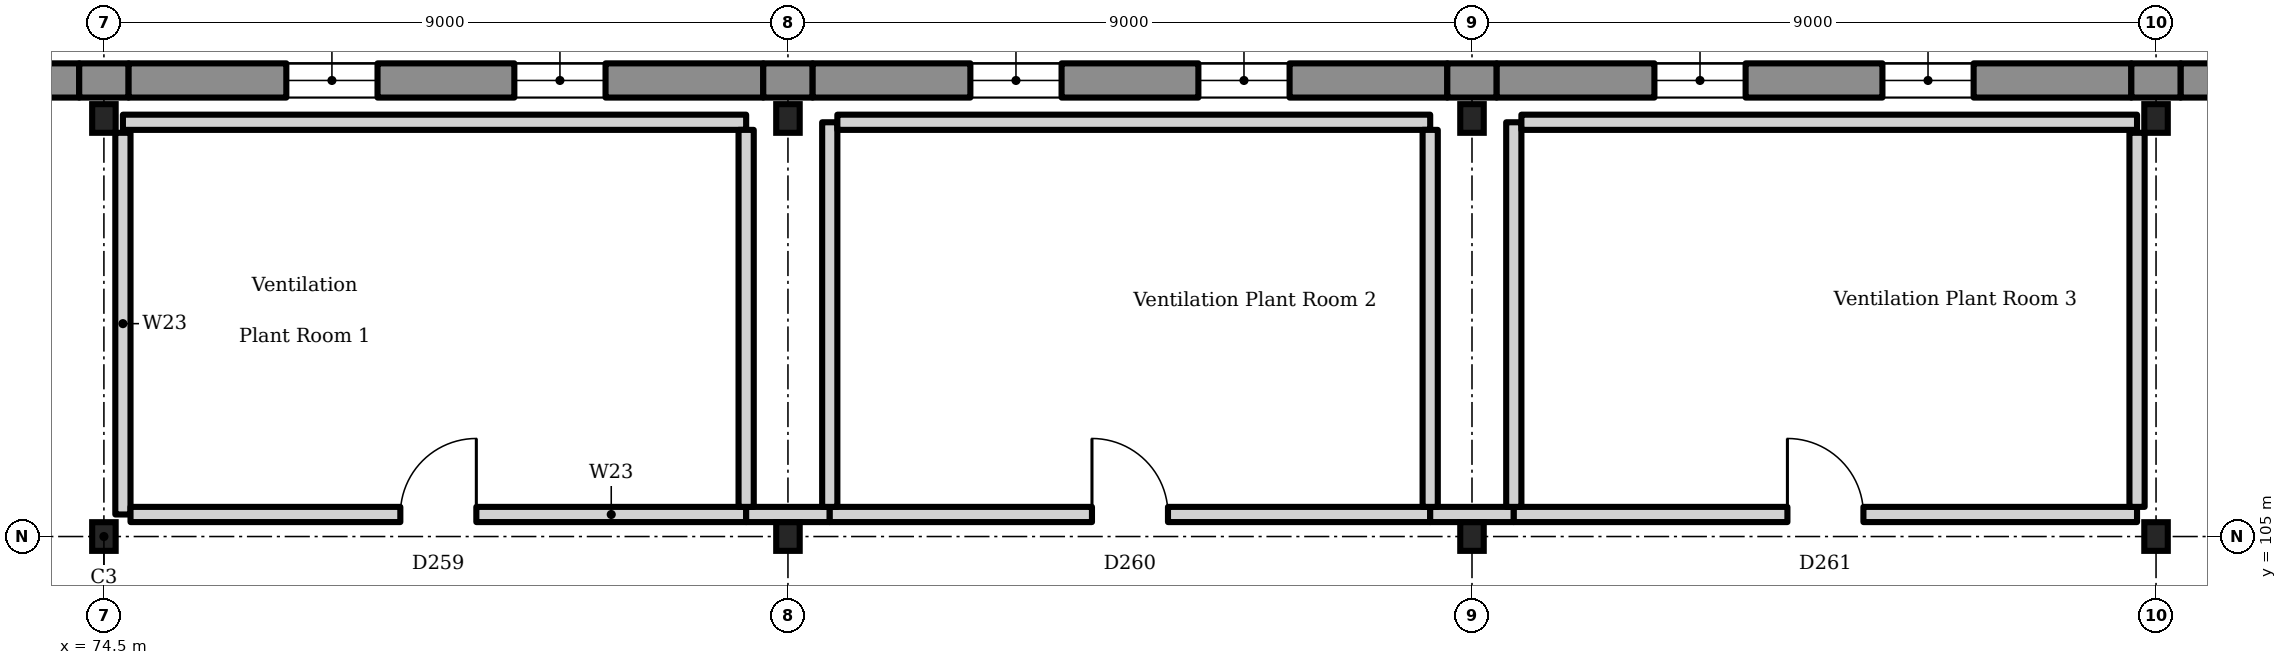
"""IFC4 building model, lengths in metres.
Left out: names, types, materials, properties, quantities, classifications, styles, units other than length and angle.
Written with IfcOpenShell. Run it as: python <this file> out.ifc"""

import sys

from ifc_helpers import new_model, si_unit, direction, frame, frame_2d, origin, origin_2d, place, context, subcontext, project, spatial, rectangle, i_section, extrude, element, fill, save


model = new_model("IFC4")
c1 = context("Model", 3, precision=1e-05, world=origin(), true_north=direction((0.0, 1.0)))
c2 = subcontext(c1, "Body", "Model", "MODEL_VIEW")
j1 = project(units=[si_unit("LENGTHUNIT", "METRE"), si_unit("PLANEANGLEUNIT", "RADIAN")], contexts=[c1])
p1 = place(None, origin())
s1 = spatial("IfcSite", under=j1, at=p1, CompositionType="ELEMENT")
p2 = place(p1, origin())
s2 = spatial("IfcBuilding", under=s1, at=p2, CompositionType="ELEMENT")
p3 = place(p2, frame((0.0, 0.0, 5.4)))
s3 = spatial("IfcBuildingStorey", under=s2, at=p3, CompositionType="ELEMENT", Elevation=5.4)
for number, where, z_axis, x_axis in (
    (1, (74.5, 105.0, 0.0), (0.0, 0.0, 1.0), (1.0, 0.0, 0.0)),
    (2, (83.5, 105.0, 0.0), (0.0, 0.0, 1.0), (1.0, 0.0, 0.0)),
    (3, (92.5, 105.0, 0.0), (0.0, 0.0, 1.0), (1.0, 0.0, 0.0)),
    (4, (101.5, 105.0, 0.0), (0.0, 0.0, 1.0), (1.0, 0.0, 0.0)),
    (5, (74.5, 110.5, 0.0), (0.0, 0.0, 1.0), (1.0, 0.0, 0.0)),
    (6, (83.5, 110.5, 0.0), (0.0, 0.0, 1.0), (1.0, 0.0, 0.0)),
    (7, (92.5, 110.5, 0.0), (0.0, 0.0, 1.0), (1.0, 0.0, 0.0)),
    (8, (101.5, 110.5, 0.0), (0.0, 0.0, 1.0), (1.0, 0.0, 0.0)),
):
    element("IfcColumn", number, at=place(p3, frame(where, z_axis=z_axis, x_axis=x_axis)), inside=s3, PredefinedType="COLUMN", context=c2, shape_type="SweptSolid", body=[
        extrude(i_section(OverallWidth=0.309, OverallDepth=0.377, WebThickness=0.021, FlangeThickness=0.04, FilletRadius=0.027, at=origin_2d()), origin(), (0.0, 0.0, 1.0), 4.5),
    ])
p4 = place(p3, frame((65.825, 111.0, 0.0), z_axis=(0.0, 0.0, 1.0), x_axis=(1.0, 0.0, 0.0)))
e9 = element("IfcWall", 9, at=p4, inside=s3, PredefinedType="SOLIDWALL", context=c2, shape_type="SweptSolid", body=[
    extrude(rectangle(XDim=8.35, YDim=0.45, at=frame_2d((4.175, 0.0))), origin(), (0.0, 0.0, 1.0), 3.8),
])
p5 = place(p4, frame((2.075, 0.0, 0.8)))
e10 = element("IfcOpeningElement", 10, at=p5, cuts=e9, PredefinedType="OPENING", context=c2, shape_type="SweptSolid", body=[
    extrude(rectangle(XDim=1.2, YDim=1.4, at=frame_2d((0.6, 0.7))), frame((0.0, 0.235, 0.0), z_axis=(0.0, -1.0, 0.0), x_axis=(1.0, 0.0, 0.0)), (0.0, 0.0, 1.0), 0.47),
])
p6 = place(p4, frame((5.075, 0.0, 0.8)))
e11 = element("IfcOpeningElement", 11, at=p6, cuts=e9, PredefinedType="OPENING", context=c2, shape_type="SweptSolid", body=[
    extrude(rectangle(XDim=1.2, YDim=1.4, at=frame_2d((0.6, 0.7))), frame((0.0, 0.235, 0.0), z_axis=(0.0, -1.0, 0.0), x_axis=(1.0, 0.0, 0.0)), (0.0, 0.0, 1.0), 0.47),
])
p7 = place(p3, frame((74.175, 111.0, 0.0), z_axis=(0.0, 0.0, 1.0), x_axis=(1.0, 0.0, 0.0)))
e12 = element("IfcWall", 12, at=p7, inside=s3, PredefinedType="SOLIDWALL", context=c2, shape_type="SweptSolid", body=[
    extrude(rectangle(XDim=0.65, YDim=0.45, at=frame_2d((0.325, 0.0))), origin(), (0.0, 0.0, 1.0), 2.3),
])
p8 = place(p3, frame((74.825, 111.0, 0.0), z_axis=(0.0, 0.0, 1.0), x_axis=(1.0, 0.0, 0.0)))
e13 = element("IfcWall", 13, at=p8, inside=s3, PredefinedType="SOLIDWALL", context=c2, shape_type="SweptSolid", body=[
    extrude(rectangle(XDim=8.35, YDim=0.45, at=frame_2d((4.175, 0.0))), origin(), (0.0, 0.0, 1.0), 3.8),
])
p9 = place(p8, frame((2.075, 0.0, 0.8)))
e14 = element("IfcOpeningElement", 14, at=p9, cuts=e13, PredefinedType="OPENING", context=c2, shape_type="SweptSolid", body=[
    extrude(rectangle(XDim=1.2, YDim=1.4, at=frame_2d((0.6, 0.7))), frame((0.0, 0.235, 0.0), z_axis=(0.0, -1.0, 0.0), x_axis=(1.0, 0.0, 0.0)), (0.0, 0.0, 1.0), 0.47),
])
p10 = place(p8, frame((5.075, 0.0, 0.8)))
e15 = element("IfcOpeningElement", 15, at=p10, cuts=e13, PredefinedType="OPENING", context=c2, shape_type="SweptSolid", body=[
    extrude(rectangle(XDim=1.2, YDim=1.4, at=frame_2d((0.6, 0.7))), frame((0.0, 0.235, 0.0), z_axis=(0.0, -1.0, 0.0), x_axis=(1.0, 0.0, 0.0)), (0.0, 0.0, 1.0), 0.47),
])
p11 = place(p3, frame((83.175, 111.0, 0.0), z_axis=(0.0, 0.0, 1.0), x_axis=(1.0, 0.0, 0.0)))
e16 = element("IfcWall", 16, at=p11, inside=s3, PredefinedType="SOLIDWALL", context=c2, shape_type="SweptSolid", body=[
    extrude(rectangle(XDim=0.65, YDim=0.45, at=frame_2d((0.325, 0.0))), origin(), (0.0, 0.0, 1.0), 2.3),
])
p12 = place(p3, frame((83.825, 111.0, 0.0), z_axis=(0.0, 0.0, 1.0), x_axis=(1.0, 0.0, 0.0)))
e17 = element("IfcWall", 17, at=p12, inside=s3, PredefinedType="SOLIDWALL", context=c2, shape_type="SweptSolid", body=[
    extrude(rectangle(XDim=8.35, YDim=0.45, at=frame_2d((4.175, 0.0))), origin(), (0.0, 0.0, 1.0), 3.8),
])
p13 = place(p12, frame((2.075, 0.0, 0.8)))
e18 = element("IfcOpeningElement", 18, at=p13, cuts=e17, PredefinedType="OPENING", context=c2, shape_type="SweptSolid", body=[
    extrude(rectangle(XDim=1.2, YDim=1.4, at=frame_2d((0.6, 0.7))), frame((0.0, 0.235, 0.0), z_axis=(0.0, -1.0, 0.0), x_axis=(1.0, 0.0, 0.0)), (0.0, 0.0, 1.0), 0.47),
])
p14 = place(p12, frame((5.075, 0.0, 0.8)))
e19 = element("IfcOpeningElement", 19, at=p14, cuts=e17, PredefinedType="OPENING", context=c2, shape_type="SweptSolid", body=[
    extrude(rectangle(XDim=1.2, YDim=1.4, at=frame_2d((0.6, 0.7))), frame((0.0, 0.235, 0.0), z_axis=(0.0, -1.0, 0.0), x_axis=(1.0, 0.0, 0.0)), (0.0, 0.0, 1.0), 0.47),
])
p15 = place(p3, frame((92.175, 111.0, 0.0), z_axis=(0.0, 0.0, 1.0), x_axis=(1.0, 0.0, 0.0)))
e20 = element("IfcWall", 20, at=p15, inside=s3, PredefinedType="SOLIDWALL", context=c2, shape_type="SweptSolid", body=[
    extrude(rectangle(XDim=0.65, YDim=0.45, at=frame_2d((0.325, 0.0))), origin(), (0.0, 0.0, 1.0), 2.3),
])
p16 = place(p3, frame((92.825, 111.0, 0.0), z_axis=(0.0, 0.0, 1.0), x_axis=(1.0, 0.0, 0.0)))
e21 = element("IfcWall", 21, at=p16, inside=s3, PredefinedType="SOLIDWALL", context=c2, shape_type="SweptSolid", body=[
    extrude(rectangle(XDim=8.35, YDim=0.45, at=frame_2d((4.175, 0.0))), origin(), (0.0, 0.0, 1.0), 3.8),
])
p17 = place(p16, frame((2.075, 0.0, 0.8)))
e22 = element("IfcOpeningElement", 22, at=p17, cuts=e21, PredefinedType="OPENING", context=c2, shape_type="SweptSolid", body=[
    extrude(rectangle(XDim=1.2, YDim=1.4, at=frame_2d((0.6, 0.7))), frame((0.0, 0.235, 0.0), z_axis=(0.0, -1.0, 0.0), x_axis=(1.0, 0.0, 0.0)), (0.0, 0.0, 1.0), 0.47),
])
p18 = place(p16, frame((5.075, 0.0, 0.8)))
e23 = element("IfcOpeningElement", 23, at=p18, cuts=e21, PredefinedType="OPENING", context=c2, shape_type="SweptSolid", body=[
    extrude(rectangle(XDim=1.2, YDim=1.4, at=frame_2d((0.6, 0.7))), frame((0.0, 0.235, 0.0), z_axis=(0.0, -1.0, 0.0), x_axis=(1.0, 0.0, 0.0)), (0.0, 0.0, 1.0), 0.47),
])
p19 = place(p3, frame((101.175, 111.0, 0.0), z_axis=(0.0, 0.0, 1.0), x_axis=(1.0, 0.0, 0.0)))
e24 = element("IfcWall", 24, at=p19, inside=s3, PredefinedType="SOLIDWALL", context=c2, shape_type="SweptSolid", body=[
    extrude(rectangle(XDim=0.65, YDim=0.45, at=frame_2d((0.325, 0.0))), origin(), (0.0, 0.0, 1.0), 2.3),
])
p20 = place(p3, frame((101.825, 111.0, 0.0), z_axis=(0.0, 0.0, 1.0), x_axis=(1.0, 0.0, 0.0)))
e25 = element("IfcWall", 25, at=p20, inside=s3, PredefinedType="SOLIDWALL", context=c2, shape_type="SweptSolid", body=[
    extrude(rectangle(XDim=8.35, YDim=0.45, at=frame_2d((4.175, 0.0))), origin(), (0.0, 0.0, 1.0), 3.8),
])
p21 = place(p20, frame((2.075, 0.0, 0.8)))
e26 = element("IfcOpeningElement", 26, at=p21, cuts=e25, PredefinedType="OPENING", context=c2, shape_type="SweptSolid", body=[
    extrude(rectangle(XDim=1.2, YDim=1.4, at=frame_2d((0.6, 0.7))), frame((0.0, 0.235, 0.0), z_axis=(0.0, -1.0, 0.0), x_axis=(1.0, 0.0, 0.0)), (0.0, 0.0, 1.0), 0.47),
])
p22 = place(p20, frame((5.075, 0.0, 0.8)))
e27 = element("IfcOpeningElement", 27, at=p22, cuts=e25, PredefinedType="OPENING", context=c2, shape_type="SweptSolid", body=[
    extrude(rectangle(XDim=1.2, YDim=1.4, at=frame_2d((0.6, 0.7))), frame((0.0, 0.235, 0.0), z_axis=(0.0, -1.0, 0.0), x_axis=(1.0, 0.0, 0.0)), (0.0, 0.0, 1.0), 0.47),
])
p23 = place(p3, frame((74.75, 110.312, 0.0), z_axis=(0.0, 0.0, 1.0), x_axis=(0.0, -1.0, 0.0)))
e28 = element("IfcWall", 28, at=p23, inside=s3, PredefinedType="SOLIDWALL", context=c2, shape_type="SweptSolid", body=[
    extrude(rectangle(XDim=5.021, YDim=0.2, at=frame_2d((2.511, 0.0))), origin(), (0.0, 0.0, 1.0), 2.3),
])
p24 = place(p3, frame((74.85, 105.29, 0.0), z_axis=(0.0, 0.0, 1.0), x_axis=(1.0, 0.0, 0.0)))
e29 = element("IfcWall", 29, at=p24, inside=s3, PredefinedType="SOLIDWALL", context=c2, shape_type="SweptSolid", body=[
    extrude(rectangle(XDim=8.1, YDim=0.2, at=frame_2d((4.05, 0.0))), origin(), (0.0, 0.0, 1.0), 2.3),
])
p25 = place(p24, frame((3.55, 0.0, 0.0)))
e30 = element("IfcOpeningElement", 30, at=p25, cuts=e29, PredefinedType="OPENING", context=c2, shape_type="SweptSolid", body=[
    extrude(rectangle(XDim=1.0, YDim=2.1, at=frame_2d((0.5, 1.05))), frame((0.0, 0.11, 0.0), z_axis=(0.0, -1.0, 0.0), x_axis=(1.0, 0.0, 0.0)), (0.0, 0.0, 1.0), 0.22),
])
p26 = place(p3, frame((82.95, 105.29, 0.0), z_axis=(0.0, 0.0, 1.0), x_axis=(1.0, 0.0, 0.0)))
e31 = element("IfcWall", 31, at=p26, inside=s3, PredefinedType="SOLIDWALL", context=c2, shape_type="SweptSolid", body=[
    extrude(rectangle(XDim=1.1, YDim=0.2, at=frame_2d((0.55, 0.0))), origin(), (0.0, 0.0, 1.0), 2.3),
])
p27 = place(p3, frame((84.05, 105.29, 0.0), z_axis=(0.0, 0.0, 1.0), x_axis=(1.0, 0.0, 0.0)))
e32 = element("IfcWall", 32, at=p27, inside=s3, PredefinedType="SOLIDWALL", context=c2, shape_type="SweptSolid", body=[
    extrude(rectangle(XDim=7.9, YDim=0.2, at=frame_2d((3.95, 0.0))), origin(), (0.0, 0.0, 1.0), 2.3),
])
p28 = place(p27, frame((3.45, 0.0, 0.0)))
e33 = element("IfcOpeningElement", 33, at=p28, cuts=e32, PredefinedType="OPENING", context=c2, shape_type="SweptSolid", body=[
    extrude(rectangle(XDim=1.0, YDim=2.1, at=frame_2d((0.5, 1.05))), frame((0.0, 0.11, 0.0), z_axis=(0.0, -1.0, 0.0), x_axis=(1.0, 0.0, 0.0)), (0.0, 0.0, 1.0), 0.22),
])
p29 = place(p3, frame((91.95, 105.29, 0.0), z_axis=(0.0, 0.0, 1.0), x_axis=(1.0, 0.0, 0.0)))
e34 = element("IfcWall", 34, at=p29, inside=s3, PredefinedType="SOLIDWALL", context=c2, shape_type="SweptSolid", body=[
    extrude(rectangle(XDim=1.1, YDim=0.2, at=frame_2d((0.55, 0.0))), origin(), (0.0, 0.0, 1.0), 2.3),
])
p30 = place(p3, frame((93.05, 105.29, 0.0), z_axis=(0.0, 0.0, 1.0), x_axis=(1.0, 0.0, 0.0)))
e35 = element("IfcWall", 35, at=p30, inside=s3, PredefinedType="SOLIDWALL", context=c2, shape_type="SweptSolid", body=[
    extrude(rectangle(XDim=8.2, YDim=0.2, at=frame_2d((4.1, 0.0))), origin(), (0.0, 0.0, 1.0), 2.3),
])
p31 = place(p30, frame((3.6, 0.0, 0.0)))
e36 = element("IfcOpeningElement", 36, at=p31, cuts=e35, PredefinedType="OPENING", context=c2, shape_type="SweptSolid", body=[
    extrude(rectangle(XDim=1.0, YDim=2.1, at=frame_2d((0.5, 1.05))), frame((0.0, 0.11, 0.0), z_axis=(0.0, -1.0, 0.0), x_axis=(1.0, 0.0, 0.0)), (0.0, 0.0, 1.0), 0.22),
])
p32 = place(p3, frame((101.25, 105.39, 0.0), z_axis=(0.0, 0.0, 1.0), x_axis=(0.0, 1.0, 0.0)))
e37 = element("IfcWall", 37, at=p32, inside=s3, PredefinedType="SOLIDWALL", context=c2, shape_type="SweptSolid", body=[
    extrude(rectangle(XDim=4.922, YDim=0.2, at=frame_2d((2.461, 0.0))), origin(), (0.0, 0.0, 1.0), 2.3),
])
p33 = place(p3, frame((74.75, 110.45, 0.0), z_axis=(0.0, 0.0, 1.0), x_axis=(1.0, 0.0, 0.0)))
e38 = element("IfcWall", 38, at=p33, inside=s3, PredefinedType="SOLIDWALL", context=c2, shape_type="SweptSolid", body=[
    extrude(rectangle(XDim=8.2, YDim=0.2, at=frame_2d((4.1, 0.0))), origin(), (0.0, 0.0, 1.0), 2.3),
])
p34 = place(p3, frame((82.95, 110.35, 0.0), z_axis=(0.0, 0.0, 1.0), x_axis=(0.0, -1.0, 0.0)))
e39 = element("IfcWall", 39, at=p34, inside=s3, PredefinedType="SOLIDWALL", context=c2, shape_type="SweptSolid", body=[
    extrude(rectangle(XDim=4.96, YDim=0.2, at=frame_2d((2.48, 0.0))), origin(), (0.0, 0.0, 1.0), 2.3),
])
p35 = place(p3, frame((84.05, 105.39, 0.0), z_axis=(0.0, 0.0, 1.0), x_axis=(0.0, 1.0, 0.0)))
e40 = element("IfcWall", 40, at=p35, inside=s3, PredefinedType="SOLIDWALL", context=c2, shape_type="SweptSolid", body=[
    extrude(rectangle(XDim=5.06, YDim=0.2, at=frame_2d((2.53, 0.0))), origin(), (0.0, 0.0, 1.0), 2.3),
])
p36 = place(p3, frame((84.15, 110.45, 0.0), z_axis=(0.0, 0.0, 1.0), x_axis=(1.0, 0.0, 0.0)))
e41 = element("IfcWall", 41, at=p36, inside=s3, PredefinedType="SOLIDWALL", context=c2, shape_type="SweptSolid", body=[
    extrude(rectangle(XDim=7.8, YDim=0.2, at=frame_2d((3.9, 0.0))), origin(), (0.0, 0.0, 1.0), 2.3),
])
p37 = place(p3, frame((91.95, 110.35, 0.0), z_axis=(0.0, 0.0, 1.0), x_axis=(0.0, -1.0, 0.0)))
e42 = element("IfcWall", 42, at=p37, inside=s3, PredefinedType="SOLIDWALL", context=c2, shape_type="SweptSolid", body=[
    extrude(rectangle(XDim=4.96, YDim=0.2, at=frame_2d((2.48, 0.0))), origin(), (0.0, 0.0, 1.0), 2.3),
])
p38 = place(p3, frame((93.05, 105.39, 0.0), z_axis=(0.0, 0.0, 1.0), x_axis=(0.0, 1.0, 0.0)))
e43 = element("IfcWall", 43, at=p38, inside=s3, PredefinedType="SOLIDWALL", context=c2, shape_type="SweptSolid", body=[
    extrude(rectangle(XDim=5.06, YDim=0.2, at=frame_2d((2.53, 0.0))), origin(), (0.0, 0.0, 1.0), 2.3),
])
p39 = place(p3, frame((93.15, 110.45, 0.0), z_axis=(0.0, 0.0, 1.0), x_axis=(1.0, 0.0, 0.0)))
e44 = element("IfcWall", 44, at=p39, inside=s3, PredefinedType="SOLIDWALL", context=c2, shape_type="SweptSolid", body=[
    extrude(rectangle(XDim=8.1, YDim=0.2, at=frame_2d((4.05, 0.0))), origin(), (0.0, 0.0, 1.0), 2.3),
])
p40 = place(p9, origin())
e45 = element("IfcWindow", 45, at=p40, inside=s3, PartitioningType="SINGLE_PANEL", PredefinedType="WINDOW", context=c2, shape_type="SweptSolid", body=[
    extrude(rectangle(XDim=1.2, YDim=1.4, at=frame_2d((0.6, 0.7))), frame((0.0, 0.03, 0.0), z_axis=(0.0, -1.0, 0.0), x_axis=(1.0, 0.0, 0.0)), (0.0, 0.0, 1.0), 0.06),
])
fill(e14, e45)
p41 = place(p10, origin())
e46 = element("IfcWindow", 46, at=p41, inside=s3, PartitioningType="SINGLE_PANEL", PredefinedType="WINDOW", context=c2, shape_type="SweptSolid", body=[
    extrude(rectangle(XDim=1.2, YDim=1.4, at=frame_2d((0.6, 0.7))), frame((0.0, 0.03, 0.0), z_axis=(0.0, -1.0, 0.0), x_axis=(1.0, 0.0, 0.0)), (0.0, 0.0, 1.0), 0.06),
])
fill(e15, e46)
p42 = place(p13, origin())
e47 = element("IfcWindow", 47, at=p42, inside=s3, PartitioningType="SINGLE_PANEL", PredefinedType="WINDOW", context=c2, shape_type="SweptSolid", body=[
    extrude(rectangle(XDim=1.2, YDim=1.4, at=frame_2d((0.6, 0.7))), frame((0.0, 0.03, 0.0), z_axis=(0.0, -1.0, 0.0), x_axis=(1.0, 0.0, 0.0)), (0.0, 0.0, 1.0), 0.06),
])
fill(e18, e47)
p43 = place(p14, origin())
e48 = element("IfcWindow", 48, at=p43, inside=s3, PartitioningType="SINGLE_PANEL", PredefinedType="WINDOW", context=c2, shape_type="SweptSolid", body=[
    extrude(rectangle(XDim=1.2, YDim=1.4, at=frame_2d((0.6, 0.7))), frame((0.0, 0.03, 0.0), z_axis=(0.0, -1.0, 0.0), x_axis=(1.0, 0.0, 0.0)), (0.0, 0.0, 1.0), 0.06),
])
fill(e19, e48)
p44 = place(p17, origin())
e49 = element("IfcWindow", 49, at=p44, inside=s3, PartitioningType="SINGLE_PANEL", PredefinedType="WINDOW", context=c2, shape_type="SweptSolid", body=[
    extrude(rectangle(XDim=1.2, YDim=1.4, at=frame_2d((0.6, 0.7))), frame((0.0, 0.03, 0.0), z_axis=(0.0, -1.0, 0.0), x_axis=(1.0, 0.0, 0.0)), (0.0, 0.0, 1.0), 0.06),
])
fill(e22, e49)
p45 = place(p18, origin())
e50 = element("IfcWindow", 50, at=p45, inside=s3, PartitioningType="SINGLE_PANEL", PredefinedType="WINDOW", context=c2, shape_type="SweptSolid", body=[
    extrude(rectangle(XDim=1.2, YDim=1.4, at=frame_2d((0.6, 0.7))), frame((0.0, 0.03, 0.0), z_axis=(0.0, -1.0, 0.0), x_axis=(1.0, 0.0, 0.0)), (0.0, 0.0, 1.0), 0.06),
])
fill(e23, e50)
p46 = place(p25, origin())
e51 = element("IfcDoor", 51, at=p46, inside=s3, OperationType="SINGLE_SWING_LEFT", PredefinedType="DOOR", context=c2, shape_type="SweptSolid", body=[
    extrude(rectangle(XDim=1.0, YDim=2.1, at=frame_2d((0.5, 1.05))), frame((0.0, 0.025, 0.0), z_axis=(0.0, -1.0, 0.0), x_axis=(1.0, 0.0, 0.0)), (0.0, 0.0, 1.0), 0.05),
])
fill(e30, e51)
p47 = place(p28, origin())
e52 = element("IfcDoor", 52, at=p47, inside=s3, OperationType="SINGLE_SWING_RIGHT", PredefinedType="DOOR", context=c2, shape_type="SweptSolid", body=[
    extrude(rectangle(XDim=1.0, YDim=2.1, at=frame_2d((0.5, 1.05))), frame((0.0, 0.025, 0.0), z_axis=(0.0, -1.0, 0.0), x_axis=(1.0, 0.0, 0.0)), (0.0, 0.0, 1.0), 0.05),
])
fill(e33, e52)
p48 = place(p31, origin())
e53 = element("IfcDoor", 53, at=p48, inside=s3, OperationType="SINGLE_SWING_RIGHT", PredefinedType="DOOR", context=c2, shape_type="SweptSolid", body=[
    extrude(rectangle(XDim=1.0, YDim=2.1, at=frame_2d((0.5, 1.05))), frame((0.0, 0.025, 0.0), z_axis=(0.0, -1.0, 0.0), x_axis=(1.0, 0.0, 0.0)), (0.0, 0.0, 1.0), 0.05),
])
fill(e36, e53)
save(model, sys.argv[1])
